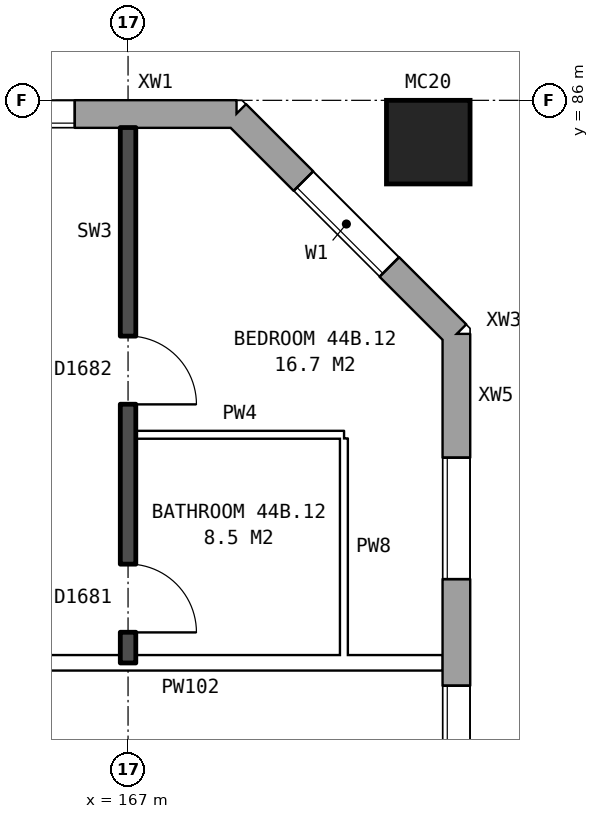
"""IFC4 building model, lengths in metres.
Left out: names, types, materials, properties, quantities, classifications, styles, units other than length and angle.
Written with IfcOpenShell. Run it as: python <this file> out.ifc"""

import sys

from ifc_helpers import new_model, si_unit, direction, frame, frame_2d, origin, origin_2d, place, context, subcontext, project, spatial, rectangle, hollow_rectangle, extrude, element, fill, save


model = new_model("IFC4")
c1 = context("Model", 3, precision=1e-05, world=origin(), true_north=direction((0.0, 1.0)))
c2 = subcontext(c1, "Body", "Model", "MODEL_VIEW")
j1 = project(units=[si_unit("LENGTHUNIT", "METRE"), si_unit("PLANEANGLEUNIT", "RADIAN")], contexts=[c1])
p1 = place(None, origin())
s1 = spatial("IfcSite", under=j1, at=p1, CompositionType="ELEMENT")
p2 = place(p1, origin())
s2 = spatial("IfcBuilding", under=s1, at=p2, CompositionType="ELEMENT")
p3 = place(p2, frame((0.0, 0.0, 157.8)))
s3 = spatial("IfcBuildingStorey", under=s2, at=p3, CompositionType="ELEMENT", Elevation=157.8)
p4 = place(p3, frame((170.95, 85.45, 0.0), z_axis=(0.0, 0.0, 1.0), x_axis=(1.0, 0.0, 0.0)))
e1 = element("IfcColumn", 1, at=p4, inside=s3, PredefinedType="COLUMN", context=c2, shape_type="SweptSolid", body=[
    extrude(hollow_rectangle(XDim=1.1, YDim=1.1, WallThickness=0.06, at=origin_2d()), origin(), (0.0, 0.0, 1.0), 3.1),
])
p5 = place(p3, frame((171.32, 57.075, 0.0), z_axis=(0.0, 0.0, 1.0), x_axis=(0.0, 1.0, 0.0)))
e2 = element("IfcWall", 2, at=p5, inside=s3, PredefinedType="STANDARD", context=c2, shape_type="SweptSolid", body=[
    extrude(rectangle(XDim=25.851, YDim=0.36, at=frame_2d((12.925, 0.0))), origin(), (0.0, 0.0, 1.0), 2.85),
])
p6 = place(p5, frame((1.625, 0.0, 0.8)))
e3 = element("IfcOpeningElement", 3, at=p6, cuts=e2, PredefinedType="OPENING", context=c2, shape_type="SweptSolid", body=[
    extrude(rectangle(XDim=1.6, YDim=1.8, at=frame_2d((0.8, 0.9))), frame((0.0, 0.19, 0.0), z_axis=(0.0, -1.0, 0.0), x_axis=(1.0, 0.0, 0.0)), (0.0, 0.0, 1.0), 0.38),
])
p7 = place(p5, frame((4.625, 0.0, 0.8)))
e4 = element("IfcOpeningElement", 4, at=p7, cuts=e2, PredefinedType="OPENING", context=c2, shape_type="SweptSolid", body=[
    extrude(rectangle(XDim=1.6, YDim=1.8, at=frame_2d((0.8, 0.9))), frame((0.0, 0.19, 0.0), z_axis=(0.0, -1.0, 0.0), x_axis=(1.0, 0.0, 0.0)), (0.0, 0.0, 1.0), 0.38),
])
p8 = place(p5, frame((6.525, 0.0, 0.8)))
e5 = element("IfcOpeningElement", 5, at=p8, cuts=e2, PredefinedType="OPENING", context=c2, shape_type="SweptSolid", body=[
    extrude(rectangle(XDim=1.6, YDim=1.5, at=frame_2d((0.8, 0.75))), frame((0.0, 0.19, 0.0), z_axis=(0.0, -1.0, 0.0), x_axis=(1.0, 0.0, 0.0)), (0.0, 0.0, 1.0), 0.38),
])
p9 = place(p5, frame((8.425, 0.0, 0.8)))
e6 = element("IfcOpeningElement", 6, at=p9, cuts=e2, PredefinedType="OPENING", context=c2, shape_type="SweptSolid", body=[
    extrude(rectangle(XDim=0.6, YDim=0.9, at=frame_2d((0.3, 0.45))), frame((0.0, 0.19, 0.0), z_axis=(0.0, -1.0, 0.0), x_axis=(1.0, 0.0, 0.0)), (0.0, 0.0, 1.0), 0.38),
])
p10 = place(p5, frame((10.225, 0.0, 1.7)))
e7 = element("IfcOpeningElement", 7, at=p10, cuts=e2, PredefinedType="OPENING", context=c2, shape_type="SweptSolid", body=[
    extrude(rectangle(XDim=1.2, YDim=0.9, at=frame_2d((0.6, 0.45))), frame((0.0, 0.19, 0.0), z_axis=(0.0, -1.0, 0.0), x_axis=(1.0, 0.0, 0.0)), (0.0, 0.0, 1.0), 0.38),
])
p11 = place(p5, frame((11.725, 0.0, 0.8)))
e8 = element("IfcOpeningElement", 8, at=p11, cuts=e2, PredefinedType="OPENING", context=c2, shape_type="SweptSolid", body=[
    extrude(rectangle(XDim=1.6, YDim=1.8, at=frame_2d((0.8, 0.9))), frame((0.0, 0.19, 0.0), z_axis=(0.0, -1.0, 0.0), x_axis=(1.0, 0.0, 0.0)), (0.0, 0.0, 1.0), 0.38),
])
p12 = place(p5, frame((19.625, 0.0, 0.8)))
e9 = element("IfcOpeningElement", 9, at=p12, cuts=e2, PredefinedType="OPENING", context=c2, shape_type="SweptSolid", body=[
    extrude(rectangle(XDim=1.6, YDim=1.8, at=frame_2d((0.8, 0.9))), frame((0.0, 0.19, 0.0), z_axis=(0.0, -1.0, 0.0), x_axis=(1.0, 0.0, 0.0)), (0.0, 0.0, 1.0), 0.38),
])
p13 = place(p5, frame((22.625, 0.0, 0.8)))
e10 = element("IfcOpeningElement", 10, at=p13, cuts=e2, PredefinedType="OPENING", context=c2, shape_type="SweptSolid", body=[
    extrude(rectangle(XDim=1.6, YDim=1.8, at=frame_2d((0.8, 0.9))), frame((0.0, 0.19, 0.0), z_axis=(0.0, -1.0, 0.0), x_axis=(1.0, 0.0, 0.0)), (0.0, 0.0, 1.0), 0.38),
])
p14 = place(p5, frame((13.625, 0.0, 1.1)))
e11 = element("IfcOpeningElement", 11, at=p14, cuts=e2, PredefinedType="OPENING", context=c2, shape_type="SweptSolid", body=[
    extrude(rectangle(XDim=1.0, YDim=1.5, at=frame_2d((0.5, 0.75))), frame((0.0, 0.19, 0.0), z_axis=(0.0, -1.0, 0.0), x_axis=(1.0, 0.0, 0.0)), (0.0, 0.0, 1.0), 0.38),
])
p15 = place(p5, frame((14.925, 0.0, 1.7)))
e12 = element("IfcOpeningElement", 12, at=p15, cuts=e2, PredefinedType="OPENING", context=c2, shape_type="SweptSolid", body=[
    extrude(rectangle(XDim=0.6, YDim=0.9, at=frame_2d((0.3, 0.45))), frame((0.0, 0.19, 0.0), z_axis=(0.0, -1.0, 0.0), x_axis=(1.0, 0.0, 0.0)), (0.0, 0.0, 1.0), 0.38),
])
p16 = place(p5, frame((16.675, 0.0, 0.8)))
e13 = element("IfcOpeningElement", 13, at=p16, cuts=e2, PredefinedType="OPENING", context=c2, shape_type="SweptSolid", body=[
    extrude(rectangle(XDim=0.6, YDim=0.9, at=frame_2d((0.3, 0.45))), frame((0.0, 0.19, 0.0), z_axis=(0.0, -1.0, 0.0), x_axis=(1.0, 0.0, 0.0)), (0.0, 0.0, 1.0), 0.38),
])
p17 = place(p5, frame((17.675, 0.0, 0.8)))
e14 = element("IfcOpeningElement", 14, at=p17, cuts=e2, PredefinedType="OPENING", context=c2, shape_type="SweptSolid", body=[
    extrude(rectangle(XDim=1.6, YDim=1.5, at=frame_2d((0.8, 0.75))), frame((0.0, 0.19, 0.0), z_axis=(0.0, -1.0, 0.0), x_axis=(1.0, 0.0, 0.0)), (0.0, 0.0, 1.0), 0.38),
])
p18 = place(p3, frame((171.32, 82.925, 0.0), z_axis=(0.0, 0.0, 1.0), x_axis=(-0.707106781187, 0.707106781187, 0.0)))
e15 = element("IfcWall", 15, at=p18, inside=s3, PredefinedType="STANDARD", context=c2, shape_type="SweptSolid", body=[
    extrude(rectangle(XDim=4.094, YDim=0.36, at=frame_2d((2.047, 0.0))), origin(), (0.0, 0.0, 1.0), 2.85),
])
p19 = place(p18, frame((1.247, 0.0, 0.8)))
e16 = element("IfcOpeningElement", 16, at=p19, cuts=e15, PredefinedType="OPENING", context=c2, shape_type="SweptSolid", body=[
    extrude(rectangle(XDim=1.6, YDim=1.8, at=frame_2d((0.8, 0.9))), frame((0.0, 0.19, 0.0), z_axis=(0.0, -1.0, 0.0), x_axis=(1.0, 0.0, 0.0)), (0.0, 0.0, 1.0), 0.38),
])
p20 = place(p3, frame((168.425, 85.82, 0.0), z_axis=(0.0, 0.0, 1.0), x_axis=(-1.0, 0.0, 0.0)))
e17 = element("IfcWall", 17, at=p20, inside=s3, PredefinedType="STANDARD", context=c2, shape_type="SweptSolid", body=[
    extrude(rectangle(XDim=34.351, YDim=0.36, at=frame_2d((17.175, 0.0))), origin(), (0.0, 0.0, 1.0), 2.85),
])
p21 = place(p20, frame((2.125, 0.0, 0.8)))
e18 = element("IfcOpeningElement", 18, at=p21, cuts=e17, PredefinedType="OPENING", context=c2, shape_type="SweptSolid", body=[
    extrude(rectangle(XDim=1.6, YDim=1.8, at=frame_2d((0.8, 0.9))), frame((0.0, 0.19, 0.0), z_axis=(0.0, -1.0, 0.0), x_axis=(1.0, 0.0, 0.0)), (0.0, 0.0, 1.0), 0.38),
])
p22 = place(p20, frame((5.125, 0.0, 0.8)))
e19 = element("IfcOpeningElement", 19, at=p22, cuts=e17, PredefinedType="OPENING", context=c2, shape_type="SweptSolid", body=[
    extrude(rectangle(XDim=1.6, YDim=1.8, at=frame_2d((0.8, 0.9))), frame((0.0, 0.19, 0.0), z_axis=(0.0, -1.0, 0.0), x_axis=(1.0, 0.0, 0.0)), (0.0, 0.0, 1.0), 0.38),
])
p23 = place(p20, frame((7.625, 0.0, 1.7)))
e20 = element("IfcOpeningElement", 20, at=p23, cuts=e17, PredefinedType="OPENING", context=c2, shape_type="SweptSolid", body=[
    extrude(rectangle(XDim=1.2, YDim=0.9, at=frame_2d((0.6, 0.45))), frame((0.0, 0.19, 0.0), z_axis=(0.0, -1.0, 0.0), x_axis=(1.0, 0.0, 0.0)), (0.0, 0.0, 1.0), 0.38),
])
p24 = place(p20, frame((11.125, 0.0, 0.8)))
e21 = element("IfcOpeningElement", 21, at=p24, cuts=e17, PredefinedType="OPENING", context=c2, shape_type="SweptSolid", body=[
    extrude(rectangle(XDim=1.6, YDim=1.8, at=frame_2d((0.8, 0.9))), frame((0.0, 0.19, 0.0), z_axis=(0.0, -1.0, 0.0), x_axis=(1.0, 0.0, 0.0)), (0.0, 0.0, 1.0), 0.38),
])
p25 = place(p20, frame((14.125, 0.0, 0.8)))
e22 = element("IfcOpeningElement", 22, at=p25, cuts=e17, PredefinedType="OPENING", context=c2, shape_type="SweptSolid", body=[
    extrude(rectangle(XDim=1.6, YDim=1.8, at=frame_2d((0.8, 0.9))), frame((0.0, 0.19, 0.0), z_axis=(0.0, -1.0, 0.0), x_axis=(1.0, 0.0, 0.0)), (0.0, 0.0, 1.0), 0.38),
])
p26 = place(p20, frame((17.125, 0.0, 0.8)))
e23 = element("IfcOpeningElement", 23, at=p26, cuts=e17, PredefinedType="OPENING", context=c2, shape_type="SweptSolid", body=[
    extrude(rectangle(XDim=1.6, YDim=1.8, at=frame_2d((0.8, 0.9))), frame((0.0, 0.19, 0.0), z_axis=(0.0, -1.0, 0.0), x_axis=(1.0, 0.0, 0.0)), (0.0, 0.0, 1.0), 0.38),
])
p27 = place(p20, frame((20.125, 0.0, 0.8)))
e24 = element("IfcOpeningElement", 24, at=p27, cuts=e17, PredefinedType="OPENING", context=c2, shape_type="SweptSolid", body=[
    extrude(rectangle(XDim=1.6, YDim=1.8, at=frame_2d((0.8, 0.9))), frame((0.0, 0.19, 0.0), z_axis=(0.0, -1.0, 0.0), x_axis=(1.0, 0.0, 0.0)), (0.0, 0.0, 1.0), 0.38),
])
p28 = place(p20, frame((22.575, 0.0, 0.45)))
e25 = element("IfcOpeningElement", 25, at=p28, cuts=e17, PredefinedType="OPENING", context=c2, shape_type="SweptSolid", body=[
    extrude(rectangle(XDim=1.2, YDim=1.8, at=frame_2d((0.6, 0.9))), frame((0.0, 0.19, 0.0), z_axis=(0.0, -1.0, 0.0), x_axis=(1.0, 0.0, 0.0)), (0.0, 0.0, 1.0), 0.38),
])
p29 = place(p20, frame((25.875, 0.0, 1.4)))
e26 = element("IfcOpeningElement", 26, at=p29, cuts=e17, PredefinedType="OPENING", context=c2, shape_type="SweptSolid", body=[
    extrude(rectangle(XDim=1.0, YDim=1.2, at=frame_2d((0.5, 0.6))), frame((0.0, 0.19, 0.0), z_axis=(0.0, -1.0, 0.0), x_axis=(1.0, 0.0, 0.0)), (0.0, 0.0, 1.0), 0.38),
])
p30 = place(p20, frame((29.125, 0.0, 0.8)))
e27 = element("IfcOpeningElement", 27, at=p30, cuts=e17, PredefinedType="OPENING", context=c2, shape_type="SweptSolid", body=[
    extrude(rectangle(XDim=1.6, YDim=1.8, at=frame_2d((0.8, 0.9))), frame((0.0, 0.19, 0.0), z_axis=(0.0, -1.0, 0.0), x_axis=(1.0, 0.0, 0.0)), (0.0, 0.0, 1.0), 0.38),
])
p31 = place(p20, frame((32.125, 0.0, 0.8)))
e28 = element("IfcOpeningElement", 28, at=p31, cuts=e17, PredefinedType="OPENING", context=c2, shape_type="SweptSolid", body=[
    extrude(rectangle(XDim=1.6, YDim=1.8, at=frame_2d((0.8, 0.9))), frame((0.0, 0.19, 0.0), z_axis=(0.0, -1.0, 0.0), x_axis=(1.0, 0.0, 0.0)), (0.0, 0.0, 1.0), 0.38),
])
p32 = place(p20, frame((9.975, 0.0, 0.8)))
e29 = element("IfcOpeningElement", 29, at=p32, cuts=e17, PredefinedType="OPENING", context=c2, shape_type="SweptSolid", body=[
    extrude(rectangle(XDim=0.8, YDim=0.9, at=frame_2d((0.4, 0.45))), frame((0.0, 0.19, 0.0), z_axis=(0.0, -1.0, 0.0), x_axis=(1.0, 0.0, 0.0)), (0.0, 0.0, 1.0), 0.38),
])
p33 = place(p20, frame((24.075, 0.0, 0.35)))
e30 = element("IfcOpeningElement", 30, at=p33, cuts=e17, PredefinedType="OPENING", context=c2, shape_type="SweptSolid", body=[
    extrude(rectangle(XDim=0.8, YDim=0.9, at=frame_2d((0.4, 0.45))), frame((0.0, 0.19, 0.0), z_axis=(0.0, -1.0, 0.0), x_axis=(1.0, 0.0, 0.0)), (0.0, 0.0, 1.0), 0.38),
])
p34 = place(p20, frame((27.175, 0.0, 0.8)))
e31 = element("IfcOpeningElement", 31, at=p34, cuts=e17, PredefinedType="OPENING", context=c2, shape_type="SweptSolid", body=[
    extrude(rectangle(XDim=1.4, YDim=1.8, at=frame_2d((0.7, 0.9))), frame((0.0, 0.19, 0.0), z_axis=(0.0, -1.0, 0.0), x_axis=(1.0, 0.0, 0.0)), (0.0, 0.0, 1.0), 0.38),
])
p35 = place(p3, frame((155.1, 78.6, 0.0), z_axis=(0.0, 0.0, 1.0), x_axis=(1.0, 0.0, 0.0)))
e32 = element("IfcWall", 32, at=p35, inside=s3, PredefinedType="PARTITIONING", context=c2, shape_type="SweptSolid", body=[
    extrude(rectangle(XDim=16.04, YDim=0.2, at=frame_2d((8.02, 0.0))), origin(), (0.0, 0.0, 1.0), 2.85),
])
p36 = place(p35, frame((3.6, 0.0, 0.0)))
e33 = element("IfcOpeningElement", 33, at=p36, cuts=e32, PredefinedType="OPENING", context=c2, shape_type="SweptSolid", body=[
    extrude(rectangle(XDim=1.0, YDim=2.1, at=frame_2d((0.5, 1.05))), frame((0.0, 0.11, 0.0), z_axis=(0.0, -1.0, 0.0), x_axis=(1.0, 0.0, 0.0)), (0.0, 0.0, 1.0), 0.22),
])
p37 = place(p35, frame((8.4, 0.0, 0.0)))
e34 = element("IfcOpeningElement", 34, at=p37, cuts=e32, PredefinedType="OPENING", context=c2, shape_type="SweptSolid", body=[
    extrude(rectangle(XDim=1.0, YDim=2.1, at=frame_2d((0.5, 1.05))), frame((0.0, 0.11, 0.0), z_axis=(0.0, -1.0, 0.0), x_axis=(1.0, 0.0, 0.0)), (0.0, 0.0, 1.0), 0.22),
])
p38 = place(p3, frame((167.1, 81.6, 0.0), z_axis=(0.0, 0.0, 1.0), x_axis=(1.0, 0.0, 0.0)))
e35 = element("IfcWall", 35, at=p38, inside=s3, PredefinedType="PARTITIONING", context=c2, shape_type="SweptSolid", body=[
    extrude(rectangle(XDim=2.74, YDim=0.1, at=frame_2d((1.37, 0.0))), origin(), (0.0, 0.0, 1.0), 2.85),
])
p39 = place(p3, frame((167.0, 78.6, 0.0), z_axis=(0.0, 0.0, 1.0), x_axis=(0.0, 1.0, 0.0)))
e36 = element("IfcWall", 36, at=p39, inside=s3, PredefinedType="SOLIDWALL", context=c2, shape_type="SweptSolid", body=[
    extrude(rectangle(XDim=7.04, YDim=0.2, at=frame_2d((3.52, 0.0))), origin(), (0.0, 0.0, 1.0), 2.85),
])
p40 = place(p39, frame((3.4, 0.0, 0.0)))
e37 = element("IfcOpeningElement", 37, at=p40, cuts=e36, PredefinedType="OPENING", context=c2, shape_type="SweptSolid", body=[
    extrude(rectangle(XDim=0.9, YDim=2.1, at=frame_2d((0.45, 1.05))), frame((0.0, 0.11, 0.0), z_axis=(0.0, -1.0, 0.0), x_axis=(1.0, 0.0, 0.0)), (0.0, 0.0, 1.0), 0.22),
])
p41 = place(p39, frame((0.4, 0.0, 0.0)))
e38 = element("IfcOpeningElement", 38, at=p41, cuts=e36, PredefinedType="OPENING", context=c2, shape_type="SweptSolid", body=[
    extrude(rectangle(XDim=0.9, YDim=2.1, at=frame_2d((0.45, 1.05))), frame((0.0, 0.11, 0.0), z_axis=(0.0, -1.0, 0.0), x_axis=(1.0, 0.0, 0.0)), (0.0, 0.0, 1.0), 0.22),
])
p42 = place(p3, frame((169.84, 78.7, 0.0), z_axis=(0.0, 0.0, 1.0), x_axis=(0.0, 1.0, 0.0)))
e39 = element("IfcWall", 39, at=p42, inside=s3, PredefinedType="PARTITIONING", context=c2, shape_type="SweptSolid", body=[
    extrude(rectangle(XDim=2.85, YDim=0.1, at=frame_2d((1.425, 0.0))), origin(), (0.0, 0.0, 1.0), 2.85),
])
p43 = place(p12, origin())
e40 = element("IfcWindow", 40, at=p43, inside=s3, PartitioningType="SINGLE_PANEL", PredefinedType="WINDOW", context=c2, shape_type="SweptSolid", body=[
    extrude(rectangle(XDim=1.6, YDim=1.8, at=frame_2d((0.8, 0.9))), frame((0.0, 0.15, 0.0), z_axis=(0.0, -1.0, 0.0), x_axis=(1.0, 0.0, 0.0)), (0.0, 0.0, 1.0), 0.06),
])
fill(e9, e40)
p44 = place(p13, origin())
e41 = element("IfcWindow", 41, at=p44, inside=s3, PartitioningType="SINGLE_PANEL", PredefinedType="WINDOW", context=c2, shape_type="SweptSolid", body=[
    extrude(rectangle(XDim=1.6, YDim=1.8, at=frame_2d((0.8, 0.9))), frame((0.0, 0.15, 0.0), z_axis=(0.0, -1.0, 0.0), x_axis=(1.0, 0.0, 0.0)), (0.0, 0.0, 1.0), 0.06),
])
fill(e10, e41)
p45 = place(p19, origin())
e42 = element("IfcWindow", 42, at=p45, inside=s3, PartitioningType="SINGLE_PANEL", PredefinedType="WINDOW", context=c2, shape_type="SweptSolid", body=[
    extrude(rectangle(XDim=1.6, YDim=1.8, at=frame_2d((0.8, 0.9))), frame((0.0, 0.15, 0.0), z_axis=(0.0, -1.0, 0.0), x_axis=(1.0, 0.0, 0.0)), (0.0, 0.0, 1.0), 0.06),
])
fill(e16, e42)
p46 = place(p21, origin())
e43 = element("IfcWindow", 43, at=p46, inside=s3, PartitioningType="SINGLE_PANEL", PredefinedType="WINDOW", context=c2, shape_type="SweptSolid", body=[
    extrude(rectangle(XDim=1.6, YDim=1.8, at=frame_2d((0.8, 0.9))), frame((0.0, 0.15, 0.0), z_axis=(0.0, -1.0, 0.0), x_axis=(1.0, 0.0, 0.0)), (0.0, 0.0, 1.0), 0.06),
])
fill(e18, e43)
p47 = place(p40, frame((0.9, 0.0, 0.0), z_axis=(0.0, 0.0, 1.0), x_axis=(-1.0, 0.0, 0.0)))
e44 = element("IfcDoor", 44, at=p47, inside=s3, OperationType="SINGLE_SWING_RIGHT", PredefinedType="DOOR", context=c2, shape_type="SweptSolid", body=[
    extrude(rectangle(XDim=0.9, YDim=2.1, at=frame_2d((0.45, 1.05))), frame((0.0, 0.025, 0.0), z_axis=(0.0, -1.0, 0.0), x_axis=(1.0, 0.0, 0.0)), (0.0, 0.0, 1.0), 0.05),
])
fill(e37, e44)
p48 = place(p41, frame((0.9, 0.0, 0.0), z_axis=(0.0, 0.0, 1.0), x_axis=(-1.0, 0.0, 0.0)))
e45 = element("IfcDoor", 45, at=p48, inside=s3, OperationType="SINGLE_SWING_RIGHT", PredefinedType="DOOR", context=c2, shape_type="SweptSolid", body=[
    extrude(rectangle(XDim=0.9, YDim=2.1, at=frame_2d((0.45, 1.05))), frame((0.0, 0.025, 0.0), z_axis=(0.0, -1.0, 0.0), x_axis=(1.0, 0.0, 0.0)), (0.0, 0.0, 1.0), 0.05),
])
fill(e38, e45)
save(model, sys.argv[1])
